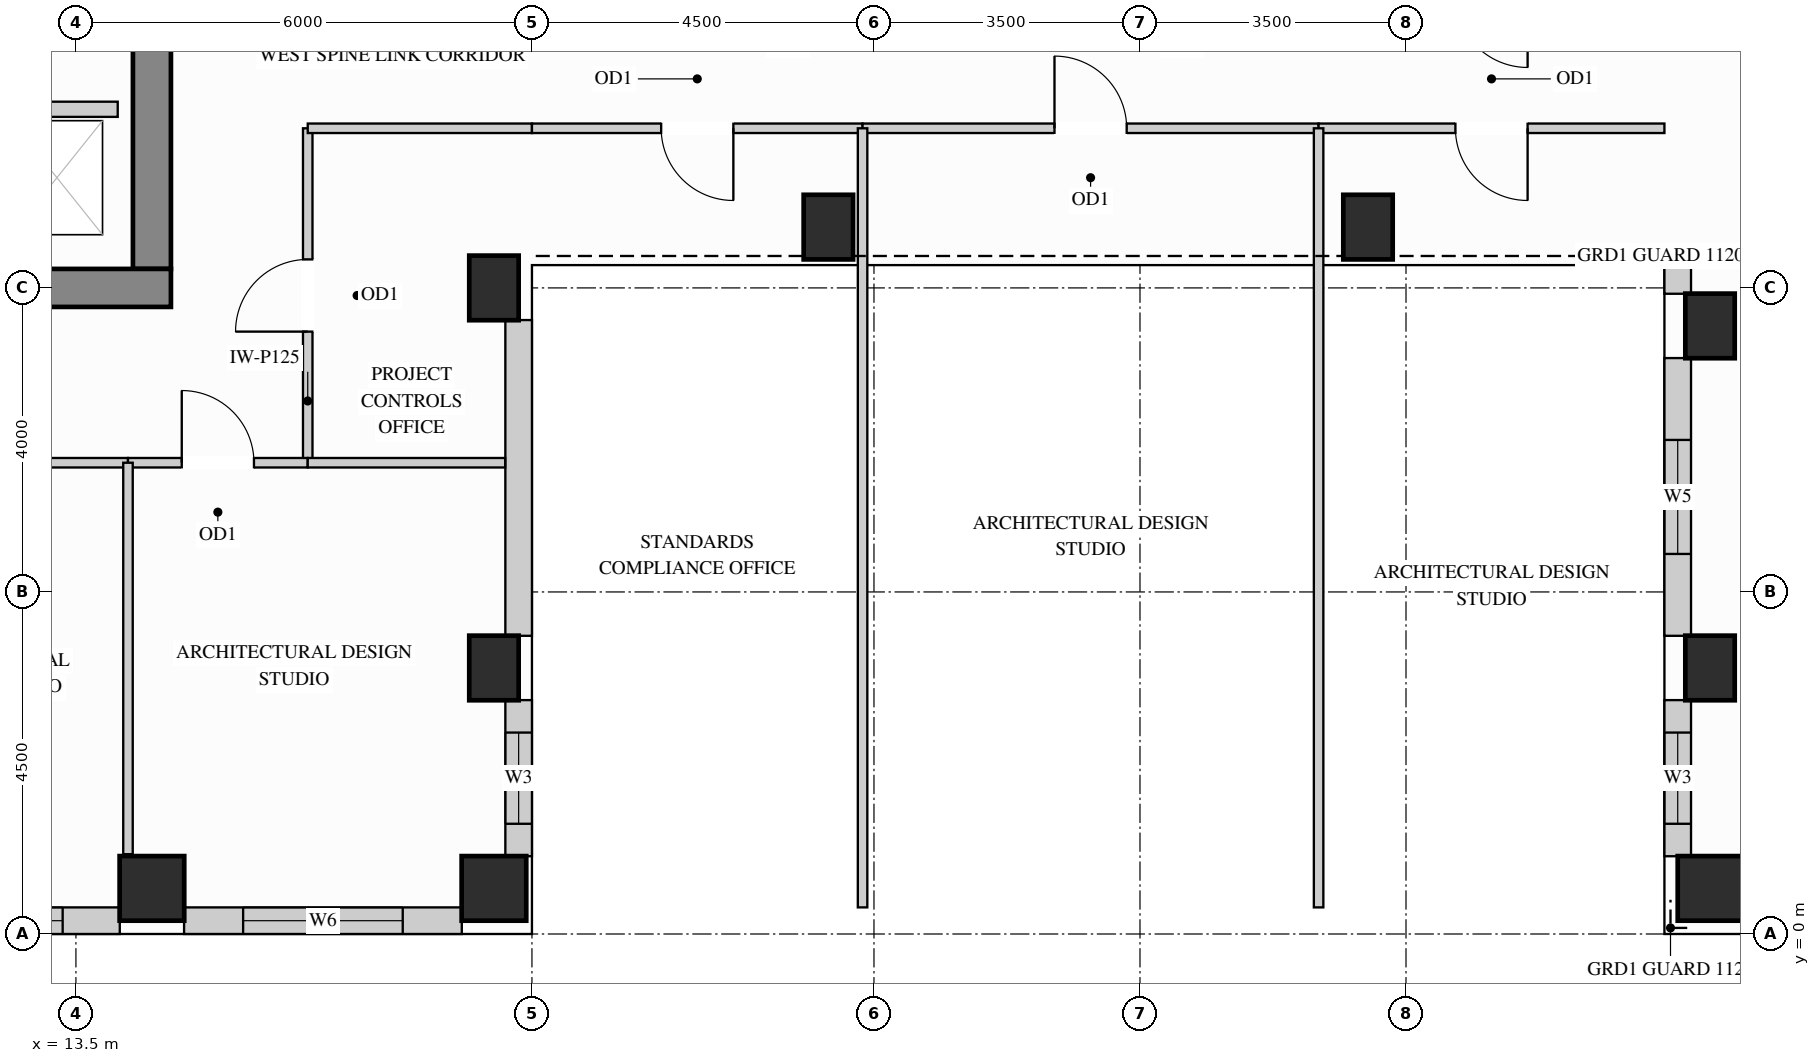
"""IFC4 building model, lengths in metres.
Left out: names, types, materials, properties, quantities, classifications, styles, units other than length and angle.
Written with IfcOpenShell. Run it as: python <this file> out.ifc"""

import sys

from ifc_helpers import new_model, si_unit, direction, frame, frame_2d, origin, origin_2d, place, context, subcontext, project, spatial, rectangle, extrude, source, transform, mapped, element, fill, save


model = new_model("IFC4")
c1 = context("Model", 3, precision=1e-05, world=origin(), true_north=direction((0.0, 1.0)))
c2 = subcontext(c1, "Body", "Model", "MODEL_VIEW")
j1 = project(units=[si_unit("LENGTHUNIT", "METRE"), si_unit("PLANEANGLEUNIT", "RADIAN")], contexts=[c1])
p1 = place(None, origin())
s1 = spatial("IfcSite", under=j1, at=p1, CompositionType="ELEMENT")
p2 = place(p1, origin())
s2 = spatial("IfcBuilding", under=s1, at=p2, CompositionType="ELEMENT")
p3 = place(p2, frame((0.0, 0.0, 241.2)))
s3 = spatial("IfcBuildingStorey", under=s2, at=p3, CompositionType="ELEMENT", Elevation=241.2)
m1 = source(origin(), c2, "Body", "SweptSolid", [
    extrude(rectangle(XDim=0.65, YDim=0.85, at=origin_2d()), origin(), (0.0, 0.0, 1.0), 3.4),
])
for number, where, z_axis, x_axis in (
    (1, (19.0, 3.5, 0.0), (0.0, 0.0, 1.0), (1.0, 0.0, 0.0)),
    (2, (19.0, 8.5, 0.0), (0.0, 0.0, 1.0), (1.0, 0.0, 0.0)),
    (3, (35.0, 3.5, 0.0), (0.0, 0.0, 1.0), (1.0, 0.0, 0.0)),
    (4, (35.0, 8.0, 0.0), (0.0, 0.0, 1.0), (1.0, 0.0, 0.0)),
    (5, (23.4, 9.3, 0.0), (0.0, 0.0, 1.0), (1.0, 0.0, 0.0)),
    (6, (30.5, 9.3, 0.0), (0.0, 0.0, 1.0), (1.0, 0.0, 0.0)),
):
    element("IfcColumn", number, at=place(p3, frame(where, z_axis=z_axis, x_axis=x_axis)), inside=s3, PredefinedType="COLUMN", context=c2, shape_type="MappedRepresentation", body=[
        mapped(m1, transform((0.0, 0.0, 0.0), x_axis=(1.0, 0.0, 0.0), y_axis=(0.0, 1.0, 0.0), z_axis=(0.0, 0.0, 1.0))),
    ])
m2 = source(origin(), c2, "Body", "SweptSolid", [
    extrude(rectangle(XDim=0.85, YDim=0.85, at=origin_2d()), origin(), (0.0, 0.0, 1.0), 3.4),
])
for number, where, z_axis, x_axis in (
    (7, (14.5, 0.6, 0.0), (0.0, 0.0, 1.0), (1.0, 0.0, 0.0)),
    (8, (19.0, 0.6, 0.0), (0.0, 0.0, 1.0), (1.0, 0.0, 0.0)),
    (9, (35.0, 0.6, 0.0), (0.0, 0.0, 1.0), (1.0, 0.0, 0.0)),
):
    element("IfcColumn", number, at=place(p3, frame(where, z_axis=z_axis, x_axis=x_axis)), inside=s3, PredefinedType="COLUMN", context=c2, shape_type="MappedRepresentation", body=[
        mapped(m2, transform((0.0, 0.0, 0.0), x_axis=(1.0, 0.0, 0.0), y_axis=(0.0, 1.0, 0.0), z_axis=(0.0, 0.0, 1.0))),
    ])
m3 = source(origin(), c2, "Body", "SweptSolid", [
    extrude(rectangle(XDim=10.07, YDim=0.5, at=frame_2d((5.035, 0.0))), origin(), (0.0, 0.0, 1.0), 3.4),
])
p4 = place(p3, frame((14.5, 8.75, 0.0), z_axis=(0.0, 0.0, 1.0), x_axis=(0.0, 1.0, 0.0)))
e10 = element("IfcWall", 10, at=p4, inside=s3, PredefinedType="SHEAR", context=c2, shape_type="MappedRepresentation", body=[
    mapped(m3, transform((0.0, 0.0, 0.0), x_axis=(1.0, 0.0, 0.0), y_axis=(0.0, 1.0, 0.0), z_axis=(0.0, 0.0, 1.0))),
])
m4 = source(origin(), c2, "Body", "SweptSolid", [
    extrude(rectangle(XDim=10.5, YDim=0.5, at=frame_2d((5.25, 0.0))), origin(), (0.0, 0.0, 1.0), 3.4),
])
p5 = place(p3, frame((4.25, 8.5, 0.0), z_axis=(0.0, 0.0, 1.0), x_axis=(1.0, 0.0, 0.0)))
e11 = element("IfcWall", 11, at=p5, inside=s3, PredefinedType="SHEAR", context=c2, shape_type="MappedRepresentation", body=[
    mapped(m4, transform((0.0, 0.0, 0.0), x_axis=(1.0, 0.0, 0.0), y_axis=(0.0, 1.0, 0.0), z_axis=(0.0, 0.0, 1.0))),
])
p6 = place(p3, frame((9.423, 0.175, 0.0), z_axis=(0.0, 0.0, 1.0), x_axis=(1.0, 0.0, 0.0)))
e12 = element("IfcWall", 12, at=p6, inside=s3, PredefinedType="SOLIDWALL", context=c2, shape_type="SweptSolid", body=[
    extrude(rectangle(XDim=4.654, YDim=0.35, at=frame_2d((2.327, 0.0))), origin(), (0.0, 0.0, 1.0), 3.385),
])
p7 = place(p6, frame((1.802, 0.0, 0.78)))
e13 = element("IfcOpeningElement", 13, at=p7, cuts=e12, PredefinedType="OPENING", context=c2, shape_type="SweptSolid", body=[
    extrude(rectangle(XDim=2.1, YDim=2.25, at=frame_2d((1.05, 1.125))), frame((0.0, 0.185, 0.0), z_axis=(0.0, -1.0, 0.0), x_axis=(1.0, 0.0, 0.0)), (0.0, 0.0, 1.0), 0.37),
])
p8 = place(p3, frame((14.923, 0.175, 0.0), z_axis=(0.0, 0.0, 1.0), x_axis=(1.0, 0.0, 0.0)))
e14 = element("IfcWall", 14, at=p8, inside=s3, PredefinedType="SOLIDWALL", context=c2, shape_type="SweptSolid", body=[
    extrude(rectangle(XDim=3.654, YDim=0.35, at=frame_2d((1.827, 0.0))), origin(), (0.0, 0.0, 1.0), 3.385),
])
p9 = place(p8, frame((0.777, 0.0, 0.78)))
e15 = element("IfcOpeningElement", 15, at=p9, cuts=e14, PredefinedType="OPENING", context=c2, shape_type="SweptSolid", body=[
    extrude(rectangle(XDim=2.1, YDim=2.25, at=frame_2d((1.05, 1.125))), frame((0.0, 0.185, 0.0), z_axis=(0.0, -1.0, 0.0), x_axis=(1.0, 0.0, 0.0)), (0.0, 0.0, 1.0), 0.37),
])
p10 = place(p3, frame((19.325, 1.023, 0.0), z_axis=(0.0, 0.0, 1.0), x_axis=(0.0, 1.0, 0.0)))
e16 = element("IfcWall", 16, at=p10, inside=s3, PredefinedType="SOLIDWALL", context=c2, shape_type="SweptSolid", body=[
    extrude(rectangle(XDim=2.054, YDim=0.35, at=frame_2d((1.027, 0.0))), origin(), (0.0, 0.0, 1.0), 2.619),
])
p11 = place(p10, frame((0.427, 0.0, 0.78)))
e17 = element("IfcOpeningElement", 17, at=p11, cuts=e16, PredefinedType="OPENING", context=c2, shape_type="SweptSolid", body=[
    extrude(rectangle(XDim=1.2, YDim=1.659, at=frame_2d((0.6, 0.83))), frame((0.0, 0.185, 0.0), z_axis=(0.0, -1.0, 0.0), x_axis=(1.0, 0.0, 0.0)), (0.0, 0.0, 1.0), 0.37),
])
m5 = source(origin(), c2, "Body", "SweptSolid", [
    extrude(rectangle(XDim=4.154, YDim=0.35, at=frame_2d((2.077, 0.0))), origin(), (0.0, 0.0, 1.0), 2.619),
])
p12 = place(p3, frame((19.325, 3.923, 0.0), z_axis=(0.0, 0.0, 1.0), x_axis=(0.0, 1.0, 0.0)))
e18 = element("IfcWall", 18, at=p12, inside=s3, PredefinedType="SOLIDWALL", context=c2, shape_type="MappedRepresentation", body=[
    mapped(m5, transform((0.0, 0.0, 0.0), x_axis=(1.0, 0.0, 0.0), y_axis=(0.0, 1.0, 0.0), z_axis=(0.0, 0.0, 1.0))),
])
m6 = source(origin(), c2, "Body", "SweptSolid", [
    extrude(rectangle(XDim=0.379, YDim=0.35, at=frame_2d((0.189, 0.0))), origin(), (0.0, 0.0, 1.0), 3.385),
])
p13 = place(p3, frame((34.575, 8.802, 0.0), z_axis=(0.0, 0.0, 1.0), x_axis=(0.0, -1.0, 0.0)))
e19 = element("IfcWall", 19, at=p13, inside=s3, PredefinedType="SOLIDWALL", context=c2, shape_type="MappedRepresentation", body=[
    mapped(m6, transform((0.0, 0.0, 0.0), x_axis=(1.0, 0.0, 0.0), y_axis=(0.0, 1.0, 0.0), z_axis=(0.0, 0.0, 1.0))),
])
p14 = place(p3, frame((34.575, 7.577, 0.0), z_axis=(0.0, 0.0, 1.0), x_axis=(0.0, -1.0, 0.0)))
e20 = element("IfcWall", 20, at=p14, inside=s3, PredefinedType="SOLIDWALL", context=c2, shape_type="SweptSolid", body=[
    extrude(rectangle(XDim=3.654, YDim=0.35, at=frame_2d((1.827, 0.0))), origin(), (0.0, 0.0, 1.0), 3.385),
])
p15 = place(p14, frame((1.077, 0.0, 0.78)))
e21 = element("IfcOpeningElement", 21, at=p15, cuts=e20, PredefinedType="OPENING", context=c2, shape_type="SweptSolid", body=[
    extrude(rectangle(XDim=1.5, YDim=2.0, at=frame_2d((0.75, 1.0))), frame((0.0, 0.185, 0.0), z_axis=(0.0, -1.0, 0.0), x_axis=(1.0, 0.0, 0.0)), (0.0, 0.0, 1.0), 0.37),
])
p16 = place(p3, frame((34.575, 3.077, 0.0), z_axis=(0.0, 0.0, 1.0), x_axis=(0.0, -1.0, 0.0)))
e22 = element("IfcWall", 22, at=p16, inside=s3, PredefinedType="SOLIDWALL", context=c2, shape_type="SweptSolid", body=[
    extrude(rectangle(XDim=2.054, YDim=0.35, at=frame_2d((1.027, 0.0))), origin(), (0.0, 0.0, 1.0), 3.385),
])
p17 = place(p16, frame((0.427, 0.0, 0.78)))
e23 = element("IfcOpeningElement", 23, at=p17, cuts=e22, PredefinedType="OPENING", context=c2, shape_type="SweptSolid", body=[
    extrude(rectangle(XDim=1.2, YDim=2.0, at=frame_2d((0.6, 1.0))), frame((0.0, 0.185, 0.0), z_axis=(0.0, -1.0, 0.0), x_axis=(1.0, 0.0, 0.0)), (0.0, 0.0, 1.0), 0.37),
])
p18 = place(p3, frame((16.55, 6.2, 0.0), z_axis=(0.0, 0.0, 1.0), x_axis=(0.0, 1.0, 0.0)))
e24 = element("IfcWall", 24, at=p18, inside=s3, PredefinedType="PARTITIONING", context=c2, shape_type="SweptSolid", body=[
    extrude(rectangle(XDim=4.4, YDim=0.125, at=frame_2d((2.2, 0.0))), origin(), (0.0, 0.0, 1.0), 3.385),
])
p19 = place(p18, frame((1.725, 0.0, 0.0)))
e25 = element("IfcOpeningElement", 25, at=p19, cuts=e24, PredefinedType="OPENING", context=c2, shape_type="SweptSolid", body=[
    extrude(rectangle(XDim=0.95, YDim=2.15, at=frame_2d((0.475, 1.075))), frame((0.0, 0.073, 0.0), z_axis=(0.0, -1.0, 0.0), x_axis=(1.0, 0.0, 0.0)), (0.0, 0.0, 1.0), 0.145),
])
m7 = source(origin(), c2, "Body", "SweptSolid", [
    extrude(rectangle(XDim=2.95, YDim=0.125, at=frame_2d((1.475, 0.0))), origin(), (0.0, 0.0, 1.0), 3.385),
])
p20 = place(p3, frame((16.55, 10.6, 0.0), z_axis=(0.0, 0.0, 1.0), x_axis=(1.0, 0.0, 0.0)))
e26 = element("IfcWall", 26, at=p20, inside=s3, PredefinedType="PARTITIONING", context=c2, shape_type="MappedRepresentation", body=[
    mapped(m7, transform((0.0, 0.0, 0.0), x_axis=(1.0, 0.0, 0.0), y_axis=(0.0, 1.0, 0.0), z_axis=(0.0, 0.0, 1.0))),
])
p21 = place(p3, frame((19.5, 10.6, 0.0), z_axis=(0.0, 0.0, 1.0), x_axis=(1.0, 0.0, 0.0)))
e27 = element("IfcWall", 27, at=p21, inside=s3, PredefinedType="PARTITIONING", context=c2, shape_type="SweptSolid", body=[
    extrude(rectangle(XDim=4.35, YDim=0.125, at=frame_2d((2.175, 0.0))), origin(), (0.0, 0.0, 1.0), 3.385),
])
p22 = place(p21, frame((1.7, 0.0, 0.0)))
e28 = element("IfcOpeningElement", 28, at=p22, cuts=e27, PredefinedType="OPENING", context=c2, shape_type="SweptSolid", body=[
    extrude(rectangle(XDim=0.95, YDim=2.15, at=frame_2d((0.475, 1.075))), frame((0.0, 0.073, 0.0), z_axis=(0.0, -1.0, 0.0), x_axis=(1.0, 0.0, 0.0)), (0.0, 0.0, 1.0), 0.145),
])
p23 = place(p3, frame((23.85, 10.6, 0.0), z_axis=(0.0, 0.0, 1.0), x_axis=(1.0, 0.0, 0.0)))
e29 = element("IfcWall", 29, at=p23, inside=s3, PredefinedType="PARTITIONING", context=c2, shape_type="SweptSolid", body=[
    extrude(rectangle(XDim=6.0, YDim=0.125, at=frame_2d((3.0, 0.0))), origin(), (0.0, 0.0, 1.0), 3.385),
])
p24 = place(p23, frame((2.525, 0.0, 0.0)))
e30 = element("IfcOpeningElement", 30, at=p24, cuts=e29, PredefinedType="OPENING", context=c2, shape_type="SweptSolid", body=[
    extrude(rectangle(XDim=0.95, YDim=2.15, at=frame_2d((0.475, 1.075))), frame((0.0, 0.073, 0.0), z_axis=(0.0, -1.0, 0.0), x_axis=(1.0, 0.0, 0.0)), (0.0, 0.0, 1.0), 0.145),
])
p25 = place(p3, frame((29.85, 10.6, 0.0), z_axis=(0.0, 0.0, 1.0), x_axis=(1.0, 0.0, 0.0)))
e31 = element("IfcWall", 31, at=p25, inside=s3, PredefinedType="PARTITIONING", context=c2, shape_type="SweptSolid", body=[
    extrude(rectangle(XDim=4.55, YDim=0.125, at=frame_2d((2.275, 0.0))), origin(), (0.0, 0.0, 1.0), 3.385),
])
p26 = place(p25, frame((1.8, 0.0, 0.0)))
e32 = element("IfcOpeningElement", 32, at=p26, cuts=e31, PredefinedType="OPENING", context=c2, shape_type="SweptSolid", body=[
    extrude(rectangle(XDim=0.95, YDim=2.15, at=frame_2d((0.475, 1.075))), frame((0.0, 0.073, 0.0), z_axis=(0.0, -1.0, 0.0), x_axis=(1.0, 0.0, 0.0)), (0.0, 0.0, 1.0), 0.145),
])
m8 = source(origin(), c2, "Body", "SweptSolid", [
    extrude(rectangle(XDim=10.25, YDim=0.125, at=frame_2d((5.125, 0.0))), origin(), (0.0, 0.0, 1.0), 3.385),
])
for number, where, z_axis, x_axis in (
    (33, (23.85, 0.35, 0.0), (0.0, 0.0, 1.0), (0.0, 1.0, 0.0)),
    (34, (29.85, 0.35, 0.0), (0.0, 0.0, 1.0), (0.0, 1.0, 0.0)),
):
    element("IfcWall", number, at=place(p3, frame(where, z_axis=z_axis, x_axis=x_axis)), inside=s3, PredefinedType="PARTITIONING", context=c2, shape_type="MappedRepresentation", body=[
        mapped(m8, transform((0.0, 0.0, 0.0), x_axis=(1.0, 0.0, 0.0), y_axis=(0.0, 1.0, 0.0), z_axis=(0.0, 0.0, 1.0))),
    ])
p27 = place(p3, frame((10.544, 6.2, 0.0), z_axis=(0.0, 0.0, 1.0), x_axis=(1.0, 0.0, 0.0)))
e35 = element("IfcWall", 35, at=p27, inside=s3, PredefinedType="PARTITIONING", context=c2, shape_type="SweptSolid", body=[
    extrude(rectangle(XDim=3.641, YDim=0.125, at=frame_2d((1.821, 0.0))), origin(), (0.0, 0.0, 1.0), 2.848),
])
p28 = place(p27, frame((1.345, 0.0, 0.0)))
e36 = element("IfcOpeningElement", 36, at=p28, cuts=e35, PredefinedType="OPENING", context=c2, shape_type="SweptSolid", body=[
    extrude(rectangle(XDim=0.95, YDim=2.15, at=frame_2d((0.475, 1.075))), frame((0.0, 0.073, 0.0), z_axis=(0.0, -1.0, 0.0), x_axis=(1.0, 0.0, 0.0)), (0.0, 0.0, 1.0), 0.145),
])
p29 = place(p3, frame((14.185, 6.2, 0.0), z_axis=(0.0, 0.0, 1.0), x_axis=(1.0, 0.0, 0.0)))
e37 = element("IfcWall", 37, at=p29, inside=s3, PredefinedType="PARTITIONING", context=c2, shape_type="SweptSolid", body=[
    extrude(rectangle(XDim=2.365, YDim=0.125, at=frame_2d((1.183, 0.0))), origin(), (0.0, 0.0, 1.0), 2.848),
])
p30 = place(p29, frame((0.708, 0.0, 0.0)))
e38 = element("IfcOpeningElement", 38, at=p30, cuts=e37, PredefinedType="OPENING", context=c2, shape_type="SweptSolid", body=[
    extrude(rectangle(XDim=0.95, YDim=2.15, at=frame_2d((0.475, 1.075))), frame((0.0, 0.073, 0.0), z_axis=(0.0, -1.0, 0.0), x_axis=(1.0, 0.0, 0.0)), (0.0, 0.0, 1.0), 0.145),
])
m9 = source(origin(), c2, "Body", "SweptSolid", [
    extrude(rectangle(XDim=2.598, YDim=0.125, at=frame_2d((1.299, 0.0))), origin(), (0.0, 0.0, 1.0), 2.848),
])
p31 = place(p3, frame((16.55, 6.2, 0.0), z_axis=(0.0, 0.0, 1.0), x_axis=(1.0, 0.0, 0.0)))
e39 = element("IfcWall", 39, at=p31, inside=s3, PredefinedType="PARTITIONING", context=c2, shape_type="MappedRepresentation", body=[
    mapped(m9, transform((0.0, 0.0, 0.0), x_axis=(1.0, 0.0, 0.0), y_axis=(0.0, 1.0, 0.0), z_axis=(0.0, 0.0, 1.0))),
])
m10 = source(origin(), c2, "Body", "SweptSolid", [
    extrude(rectangle(XDim=5.15, YDim=0.125, at=frame_2d((2.575, 0.0))), origin(), (0.0, 0.0, 1.0), 3.385),
])
p32 = place(p3, frame((14.185, 1.05, 0.0), z_axis=(0.0, 0.0, 1.0), x_axis=(0.0, 1.0, 0.0)))
e40 = element("IfcWall", 40, at=p32, inside=s3, PredefinedType="PARTITIONING", context=c2, shape_type="MappedRepresentation", body=[
    mapped(m10, transform((0.0, 0.0, 0.0), x_axis=(1.0, 0.0, 0.0), y_axis=(0.0, 1.0, 0.0), z_axis=(0.0, 0.0, 1.0))),
])
m11 = source(origin(), c2, "Body", "SweptSolid", [
    extrude(rectangle(XDim=1.63, YDim=0.2, at=frame_2d((0.815, 0.0))), origin(), (0.0, 0.0, 1.0), 3.385),
])
p33 = place(p3, frame((12.42, 10.85, 0.0), z_axis=(0.0, 0.0, 1.0), x_axis=(1.0, 0.0, 0.0)))
e41 = element("IfcWall", 41, at=p33, inside=s3, PredefinedType="PARTITIONING", context=c2, shape_type="MappedRepresentation", body=[
    mapped(m11, transform((0.0, 0.0, 0.0), x_axis=(1.0, 0.0, 0.0), y_axis=(0.0, 1.0, 0.0), z_axis=(0.0, 0.0, 1.0))),
])
m12 = source(origin(), c2, "Body", "SweptSolid", [
    extrude(rectangle(XDim=0.95, YDim=2.15, at=frame_2d((0.475, 1.075))), frame((0.0, 0.025, 0.0), z_axis=(0.0, -1.0, 0.0), x_axis=(1.0, 0.0, 0.0)), (0.0, 0.0, 1.0), 0.05),
])
p34 = place(p19, origin())
e42 = element("IfcDoor", 42, at=p34, inside=s3, OperationType="SINGLE_SWING_LEFT", PredefinedType="DOOR", context=c2, shape_type="MappedRepresentation", body=[
    mapped(m12, transform((0.0, 0.0, 0.0), x_axis=(1.0, 0.0, 0.0), y_axis=(0.0, 1.0, 0.0), z_axis=(0.0, 0.0, 1.0))),
])
fill(e25, e42)
p35 = place(p30, origin())
e43 = element("IfcDoor", 43, at=p35, inside=s3, OperationType="SINGLE_SWING_LEFT", PredefinedType="DOOR", context=c2, shape_type="MappedRepresentation", body=[
    mapped(m12, transform((0.0, 0.0, 0.0), x_axis=(1.0, 0.0, 0.0), y_axis=(0.0, 1.0, 0.0), z_axis=(0.0, 0.0, 1.0))),
])
fill(e38, e43)
p36 = place(p22, origin())
e44 = element("IfcDoor", 44, at=p36, inside=s3, OperationType="SINGLE_SWING_RIGHT", PredefinedType="DOOR", context=c2, shape_type="MappedRepresentation", body=[
    mapped(m12, transform((0.0, 0.0, 0.0), x_axis=(1.0, 0.0, 0.0), y_axis=(0.0, 1.0, 0.0), z_axis=(0.0, 0.0, 1.0))),
])
fill(e28, e44)
p37 = place(p24, origin())
e45 = element("IfcDoor", 45, at=p37, inside=s3, OperationType="SINGLE_SWING_LEFT", PredefinedType="DOOR", context=c2, shape_type="MappedRepresentation", body=[
    mapped(m12, transform((0.0, 0.0, 0.0), x_axis=(1.0, 0.0, 0.0), y_axis=(0.0, 1.0, 0.0), z_axis=(0.0, 0.0, 1.0))),
])
fill(e30, e45)
p38 = place(p26, origin())
e46 = element("IfcDoor", 46, at=p38, inside=s3, OperationType="SINGLE_SWING_RIGHT", PredefinedType="DOOR", context=c2, shape_type="MappedRepresentation", body=[
    mapped(m12, transform((0.0, 0.0, 0.0), x_axis=(1.0, 0.0, 0.0), y_axis=(0.0, 1.0, 0.0), z_axis=(0.0, 0.0, 1.0))),
])
fill(e32, e46)
m13 = source(origin(), c2, "Body", "SweptSolid", [
    extrude(rectangle(XDim=1.2, YDim=1.659, at=frame_2d((0.6, 0.83))), frame((0.0, 0.03, 0.0), z_axis=(0.0, -1.0, 0.0), x_axis=(1.0, 0.0, 0.0)), (0.0, 0.0, 1.0), 0.06),
])
p39 = place(p11, origin())
e47 = element("IfcWindow", 47, at=p39, inside=s3, PartitioningType="SINGLE_PANEL", PredefinedType="WINDOW", context=c2, shape_type="MappedRepresentation", body=[
    mapped(m13, transform((0.0, 0.0, 0.0), x_axis=(1.0, 0.0, 0.0), y_axis=(0.0, 1.0, 0.0), z_axis=(0.0, 0.0, 1.0))),
])
fill(e17, e47)
m14 = source(origin(), c2, "Body", "SweptSolid", [
    extrude(rectangle(XDim=1.2, YDim=2.0, at=frame_2d((0.6, 1.0))), frame((0.0, 0.03, 0.0), z_axis=(0.0, -1.0, 0.0), x_axis=(1.0, 0.0, 0.0)), (0.0, 0.0, 1.0), 0.06),
])
p40 = place(p17, origin())
e48 = element("IfcWindow", 48, at=p40, inside=s3, PartitioningType="SINGLE_PANEL", PredefinedType="WINDOW", context=c2, shape_type="MappedRepresentation", body=[
    mapped(m14, transform((0.0, 0.0, 0.0), x_axis=(1.0, 0.0, 0.0), y_axis=(0.0, 1.0, 0.0), z_axis=(0.0, 0.0, 1.0))),
])
fill(e23, e48)
m15 = source(origin(), c2, "Body", "SweptSolid", [
    extrude(rectangle(XDim=1.5, YDim=2.0, at=frame_2d((0.75, 1.0))), frame((0.0, 0.03, 0.0), z_axis=(0.0, -1.0, 0.0), x_axis=(1.0, 0.0, 0.0)), (0.0, 0.0, 1.0), 0.06),
])
p41 = place(p15, origin())
e49 = element("IfcWindow", 49, at=p41, inside=s3, PartitioningType="SINGLE_PANEL", PredefinedType="WINDOW", context=c2, shape_type="MappedRepresentation", body=[
    mapped(m15, transform((0.0, 0.0, 0.0), x_axis=(1.0, 0.0, 0.0), y_axis=(0.0, 1.0, 0.0), z_axis=(0.0, 0.0, 1.0))),
])
fill(e21, e49)
m16 = source(origin(), c2, "Body", "SweptSolid", [
    extrude(rectangle(XDim=2.1, YDim=2.25, at=frame_2d((1.05, 1.125))), frame((0.0, 0.03, 0.0), z_axis=(0.0, -1.0, 0.0), x_axis=(1.0, 0.0, 0.0)), (0.0, 0.0, 1.0), 0.06),
])
p42 = place(p7, origin())
e50 = element("IfcWindow", 50, at=p42, inside=s3, PartitioningType="SINGLE_PANEL", PredefinedType="WINDOW", context=c2, shape_type="MappedRepresentation", body=[
    mapped(m16, transform((0.0, 0.0, 0.0), x_axis=(1.0, 0.0, 0.0), y_axis=(0.0, 1.0, 0.0), z_axis=(0.0, 0.0, 1.0))),
])
fill(e13, e50)
p43 = place(p9, origin())
e51 = element("IfcWindow", 51, at=p43, inside=s3, PartitioningType="SINGLE_PANEL", PredefinedType="WINDOW", context=c2, shape_type="MappedRepresentation", body=[
    mapped(m16, transform((0.0, 0.0, 0.0), x_axis=(1.0, 0.0, 0.0), y_axis=(0.0, 1.0, 0.0), z_axis=(0.0, 0.0, 1.0))),
])
fill(e15, e51)
save(model, sys.argv[1])
